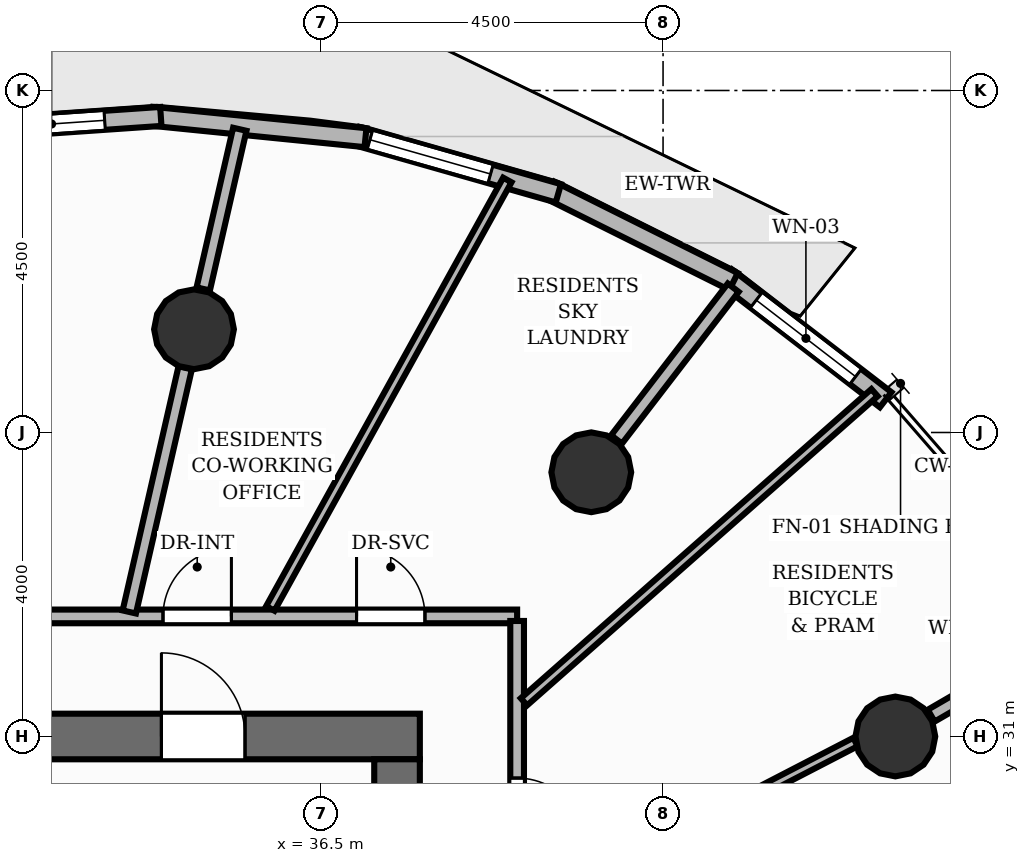
"""IFC4 building model, lengths in metres.
Left out: names, types, materials, properties, quantities, classifications, styles, units other than length and angle.
Written with IfcOpenShell. Run it as: python <this file> out.ifc"""

import sys

from ifc_helpers import new_model, si_unit, direction, frame, frame_2d, origin, origin_2d, place, context, subcontext, project, spatial, rectangle, circle, extrude, element, fill, save


model = new_model("IFC4")
c1 = context("Model", 3, precision=1e-05, world=origin(), true_north=direction((0.0, 1.0)))
c2 = subcontext(c1, "Body", "Model", "MODEL_VIEW")
j1 = project(units=[si_unit("LENGTHUNIT", "METRE"), si_unit("PLANEANGLEUNIT", "RADIAN")], contexts=[c1])
p1 = place(None, origin())
s1 = spatial("IfcSite", under=j1, at=p1, CompositionType="ELEMENT")
p2 = place(p1, origin())
s2 = spatial("IfcBuilding", under=s1, at=p2, CompositionType="ELEMENT")
p3 = place(p2, frame((0.0, 0.0, 145.76)))
s3 = spatial("IfcBuildingStorey", under=s2, at=p3, CompositionType="ELEMENT", Elevation=145.76)
p4 = place(p3, frame((22.7, 31.0, 0.0), z_axis=(0.0, 0.0, 1.0), x_axis=(1.0, 0.0, 0.0)))
e1 = element("IfcWall", 1, at=p4, inside=s3, PredefinedType="SHEAR", context=c2, shape_type="SweptSolid", body=[
    extrude(rectangle(XDim=15.1, YDim=0.6, at=frame_2d((7.55, 0.0))), origin(), (0.0, 0.0, 1.0), 3.2),
])
p5 = place(p4, frame((11.7, 0.0, 0.0)))
e2 = element("IfcOpeningElement", 2, at=p5, cuts=e1, PredefinedType="OPENING", context=c2, shape_type="SweptSolid", body=[
    extrude(rectangle(XDim=1.1, YDim=2.15, at=frame_2d((0.55, 1.075))), frame((0.0, 0.31, 0.0), z_axis=(0.0, -1.0, 0.0), x_axis=(1.0, 0.0, 0.0)), (0.0, 0.0, 1.0), 0.62),
])
p6 = place(p3, frame((37.5, 17.3, 0.0), z_axis=(0.0, 0.0, 1.0), x_axis=(0.0, 1.0, 0.0)))
e3 = element("IfcWall", 3, at=p6, inside=s3, PredefinedType="SHEAR", context=c2, shape_type="SweptSolid", body=[
    extrude(rectangle(XDim=13.4, YDim=0.6, at=frame_2d((6.7, 0.0))), origin(), (0.0, 0.0, 1.0), 3.2),
])
for number, where, z_axis, x_axis in (
    (4, (44.056, 31.0, 0.0), (0.0, 0.0, 1.0), (1.0, 0.0, 0.0)),
    (5, (40.056, 34.477, 0.0), (0.0, 0.0, 1.0), (1.0, 0.0, 0.0)),
    (6, (34.829, 36.358, 0.0), (0.0, 0.0, 1.0), (1.0, 0.0, 0.0)),
):
    element("IfcColumn", number, at=place(p3, frame(where, z_axis=z_axis, x_axis=x_axis)), inside=s3, PredefinedType="COLUMN", context=c2, shape_type="SweptSolid", body=[
        extrude(circle(Radius=0.525, at=origin_2d()), origin(), (0.0, 0.0, 1.0), 3.2),
    ])
p7 = place(p3, frame((41.831, 37.046, 0.0), z_axis=(0.0, 0.0, 1.0), x_axis=(0.7923805969, -0.610027040103, 0.0)))
e7 = element("IfcWall", 7, at=p7, inside=s3, PredefinedType="SOLIDWALL", context=c2, shape_type="SweptSolid", body=[
    extrude(rectangle(XDim=2.648, YDim=0.25, at=frame_2d((1.324, 0.0))), origin(), (0.0, 0.0, 1.0), 2.96),
])
p8 = place(p7, frame((0.499, 0.0, 0.85)))
e8 = element("IfcOpeningElement", 8, at=p8, cuts=e7, PredefinedType="OPENING", context=c2, shape_type="SweptSolid", body=[
    extrude(rectangle(XDim=1.65, YDim=1.55, at=frame_2d((0.825, 0.775))), frame((0.0, 0.135, 0.0), z_axis=(0.0, -1.0, 0.0), x_axis=(1.0, 0.0, 0.0)), (0.0, 0.0, 1.0), 0.27),
])
p9 = place(p3, frame((39.517, 38.188, 0.0), z_axis=(0.0, 0.0, 1.0), x_axis=(0.894843809708, -0.446379385979, 0.0)))
e9 = element("IfcWall", 9, at=p9, inside=s3, PredefinedType="SOLIDWALL", context=c2, shape_type="SweptSolid", body=[
    extrude(rectangle(XDim=2.693, YDim=0.25, at=frame_2d((1.347, 0.0))), origin(), (0.0, 0.0, 1.0), 2.96),
])
p10 = place(p3, frame((36.975, 38.9, 0.0), z_axis=(0.0, 0.0, 1.0), x_axis=(0.961851311091, -0.27357276062, 0.0)))
e10 = element("IfcWall", 10, at=p10, inside=s3, PredefinedType="SOLIDWALL", context=c2, shape_type="SweptSolid", body=[
    extrude(rectangle(XDim=2.752, YDim=0.25, at=frame_2d((1.376, 0.0))), origin(), (0.0, 0.0, 1.0), 2.96),
])
p11 = place(p10, frame((0.175, 0.0, 0.85)))
e11 = element("IfcOpeningElement", 11, at=p11, cuts=e10, PredefinedType="OPENING", context=c2, shape_type="SweptSolid", body=[
    extrude(rectangle(XDim=1.65, YDim=1.55, at=frame_2d((0.825, 0.775))), frame((0.0, 0.135, 0.0), z_axis=(0.0, -1.0, 0.0), x_axis=(1.0, 0.0, 0.0)), (0.0, 0.0, 1.0), 0.27),
])
p12 = place(p3, frame((34.281, 39.16, 0.0), z_axis=(0.0, 0.0, 1.0), x_axis=(0.995013999105, -0.099735357744, 0.0)))
e12 = element("IfcWall", 12, at=p12, inside=s3, PredefinedType="SOLIDWALL", context=c2, shape_type="SweptSolid", body=[
    extrude(rectangle(XDim=2.818, YDim=0.25, at=frame_2d((1.409, 0.0))), origin(), (0.0, 0.0, 1.0), 2.96),
])
p13 = place(p3, frame((31.517, 38.96, 0.0), z_axis=(0.0, 0.0, 1.0), x_axis=(0.997630729469, 0.068796276206, 0.0)))
e13 = element("IfcWall", 13, at=p13, inside=s3, PredefinedType="SOLIDWALL", context=c2, shape_type="SweptSolid", body=[
    extrude(rectangle(XDim=2.882, YDim=0.25, at=frame_2d((1.441, 0.0))), origin(), (0.0, 0.0, 1.0), 2.96),
])
p14 = place(p13, frame((0.741, 0.0, 0.85)))
e14 = element("IfcOpeningElement", 14, at=p14, cuts=e13, PredefinedType="OPENING", context=c2, shape_type="SweptSolid", body=[
    extrude(rectangle(XDim=1.4, YDim=1.55, at=frame_2d((0.7, 0.775))), frame((0.0, 0.135, 0.0), z_axis=(0.0, -1.0, 0.0), x_axis=(1.0, 0.0, 0.0)), (0.0, 0.0, 1.0), 0.27),
])
p15 = place(p3, frame((44.528, 31.274, 0.0), z_axis=(0.0, 0.0, 1.0), x_axis=(0.864802971131, 0.502111363268, 0.0)))
e15 = element("IfcWall", 15, at=p15, inside=s3, PredefinedType="PARTITIONING", context=c2, shape_type="SweptSolid", body=[
    extrude(rectangle(XDim=1.951, YDim=0.18, at=frame_2d((0.975, 0.0))), origin(), (0.0, 0.0, 1.0), 2.336),
])
p16 = place(p3, frame((40.388, 34.908, 0.0), z_axis=(0.0, 0.0, 1.0), x_axis=(0.609556175004, 0.792742877303, 0.0)))
e16 = element("IfcWall", 16, at=p16, inside=s3, PredefinedType="PARTITIONING", context=c2, shape_type="SweptSolid", body=[
    extrude(rectangle(XDim=2.519, YDim=0.18, at=frame_2d((1.259, 0.0))), origin(), (0.0, 0.0, 1.0), 2.336),
])
p17 = place(p3, frame((34.95, 36.889, 0.0), z_axis=(0.0, 0.0, 1.0), x_axis=(0.223080127706, 0.974800111111, 0.0)))
e17 = element("IfcWall", 17, at=p17, inside=s3, PredefinedType="PARTITIONING", context=c2, shape_type="SweptSolid", body=[
    extrude(rectangle(XDim=2.155, YDim=0.18, at=frame_2d((1.077, 0.0))), origin(), (0.0, 0.0, 1.0), 2.336),
])
p18 = place(p3, frame((21.42, 32.58, 0.0), z_axis=(0.0, 0.0, 1.0), x_axis=(1.0, 0.0, 0.0)))
e18 = element("IfcWall", 18, at=p18, inside=s3, PredefinedType="PARTITIONING", context=c2, shape_type="SweptSolid", body=[
    extrude(rectangle(XDim=17.66, YDim=0.18, at=frame_2d((8.83, 0.0))), origin(), (0.0, 0.0, 1.0), 2.955),
])
p19 = place(p18, frame((13.001, 0.0, 0.0)))
e19 = element("IfcOpeningElement", 19, at=p19, cuts=e18, PredefinedType="OPENING", context=c2, shape_type="SweptSolid", body=[
    extrude(rectangle(XDim=0.9, YDim=2.1, at=frame_2d((0.45, 1.05))), frame((0.0, 0.1, 0.0), z_axis=(0.0, -1.0, 0.0), x_axis=(1.0, 0.0, 0.0)), (0.0, 0.0, 1.0), 0.2),
])
p20 = place(p18, frame((15.547, 0.0, 0.0)))
e20 = element("IfcOpeningElement", 20, at=p20, cuts=e18, PredefinedType="OPENING", context=c2, shape_type="SweptSolid", body=[
    extrude(rectangle(XDim=0.9, YDim=2.1, at=frame_2d((0.45, 1.05))), frame((0.0, 0.1, 0.0), z_axis=(0.0, -1.0, 0.0), x_axis=(1.0, 0.0, 0.0)), (0.0, 0.0, 1.0), 0.2),
])
p21 = place(p18, frame((5.757, 0.0, 0.0)))
e21 = element("IfcOpeningElement", 21, at=p21, cuts=e18, PredefinedType="OPENING", context=c2, shape_type="SweptSolid", body=[
    extrude(rectangle(XDim=1.05, YDim=2.15, at=frame_2d((0.525, 1.075))), frame((0.0, 0.1, 0.0), z_axis=(0.0, -1.0, 0.0), x_axis=(1.0, 0.0, 0.0)), (0.0, 0.0, 1.0), 0.2),
])
p22 = place(p3, frame((39.08, 32.52, 0.0), z_axis=(0.0, 0.0, 1.0), x_axis=(0.0, -1.0, 0.0)))
e22 = element("IfcWall", 22, at=p22, inside=s3, PredefinedType="PARTITIONING", context=c2, shape_type="SweptSolid", body=[
    extrude(rectangle(XDim=3.918, YDim=0.18, at=frame_2d((1.959, 0.0))), origin(), (0.0, 0.0, 1.0), 2.955),
])
p23 = place(p22, frame((2.067, 0.0, 0.0)))
e23 = element("IfcOpeningElement", 23, at=p23, cuts=e22, PredefinedType="OPENING", context=c2, shape_type="SweptSolid", body=[
    extrude(rectangle(XDim=0.9, YDim=2.1, at=frame_2d((0.45, 1.05))), frame((0.0, 0.1, 0.0), z_axis=(0.0, -1.0, 0.0), x_axis=(1.0, 0.0, 0.0)), (0.0, 0.0, 1.0), 0.2),
])
p24 = place(p3, frame((38.951, 38.323, 0.0), z_axis=(0.0, 0.0, 1.0), x_axis=(-0.484039777335, -0.875045995338, 0.0)))
e24 = element("IfcWall", 24, at=p24, inside=s3, PredefinedType="PARTITIONING", context=c2, shape_type="SweptSolid", body=[
    extrude(rectangle(XDim=6.442, YDim=0.125, at=frame_2d((3.221, 0.0))), origin(), (0.0, 0.0, 1.0), 2.955),
])
p25 = place(p3, frame((33.977, 32.638, 0.0), z_axis=(0.0, 0.0, 1.0), x_axis=(0.22319287001, 0.974774303506, 0.0)))
e25 = element("IfcWall", 25, at=p25, inside=s3, PredefinedType="PARTITIONING", context=c2, shape_type="SweptSolid", body=[
    extrude(rectangle(XDim=3.296, YDim=0.18, at=frame_2d((1.648, 0.0))), origin(), (0.0, 0.0, 1.0), 2.336),
])
p26 = place(p3, frame((43.783, 35.524, 0.0), z_axis=(0.0, 0.0, 1.0), x_axis=(-0.750018545151, -0.661416798947, 0.0)))
e26 = element("IfcWall", 26, at=p26, inside=s3, PredefinedType="PARTITIONING", context=c2, shape_type="SweptSolid", body=[
    extrude(rectangle(XDim=6.15, YDim=0.125, at=frame_2d((3.075, 0.0))), origin(), (0.0, 0.0, 1.0), 2.692),
])
p27 = place(p3, frame((43.531, 30.927, 0.0), z_axis=(0.0, 0.0, 1.0), x_axis=(-0.888041341995, -0.459763607638, 0.0)))
e27 = element("IfcWall", 27, at=p27, inside=s3, PredefinedType="PARTITIONING", context=c2, shape_type="SweptSolid", body=[
    extrude(rectangle(XDim=4.893, YDim=0.125, at=frame_2d((2.446, 0.0))), origin(), (0.0, 0.0, 1.0), 2.336),
])
p28 = place(p27, frame((1.996, 0.0, 0.0)))
e28 = element("IfcOpeningElement", 28, at=p28, cuts=e27, PredefinedType="OPENING", context=c2, shape_type="SweptSolid", body=[
    extrude(rectangle(XDim=0.9, YDim=2.1, at=frame_2d((0.45, 1.05))), frame((0.0, 0.073, 0.0), z_axis=(0.0, -1.0, 0.0), x_axis=(1.0, 0.0, 0.0)), (0.0, 0.0, 1.0), 0.145),
])
p29 = place(p3, frame((39.174, 27.577, 0.0), z_axis=(0.0, 0.0, 1.0), x_axis=(0.9372070401, 0.348773513883, 0.0)))
e29 = element("IfcWall", 29, at=p29, inside=s3, PredefinedType="PARTITIONING", context=c2, shape_type="SweptSolid", body=[
    extrude(rectangle(XDim=8.395, YDim=0.125, at=frame_2d((4.198, 0.0))), origin(), (0.0, 0.0, 1.0), 2.692),
])
p30 = place(p8, origin())
e30 = element("IfcWindow", 30, at=p30, inside=s3, PartitioningType="SINGLE_PANEL", PredefinedType="WINDOW", context=c2, shape_type="SweptSolid", body=[
    extrude(rectangle(XDim=1.65, YDim=1.55, at=frame_2d((0.825, 0.775))), frame((0.0, 0.03, 0.0), z_axis=(0.0, -1.0, 0.0), x_axis=(1.0, 0.0, 0.0)), (0.0, 0.0, 1.0), 0.06),
])
fill(e8, e30)
p31 = place(p11, origin())
e31 = element("IfcWindow", 31, at=p31, inside=s3, PartitioningType="SINGLE_PANEL", PredefinedType="WINDOW", context=c2, shape_type="SweptSolid", body=[
    extrude(rectangle(XDim=1.65, YDim=1.55, at=frame_2d((0.825, 0.775))), frame((0.0, 0.03, 0.0), z_axis=(0.0, -1.0, 0.0), x_axis=(1.0, 0.0, 0.0)), (0.0, 0.0, 1.0), 0.06),
])
fill(e11, e31)
p32 = place(p14, origin())
e32 = element("IfcWindow", 32, at=p32, inside=s3, PartitioningType="SINGLE_PANEL", PredefinedType="WINDOW", context=c2, shape_type="SweptSolid", body=[
    extrude(rectangle(XDim=1.4, YDim=1.55, at=frame_2d((0.7, 0.775))), frame((0.0, 0.03, 0.0), z_axis=(0.0, -1.0, 0.0), x_axis=(1.0, 0.0, 0.0)), (0.0, 0.0, 1.0), 0.06),
])
fill(e14, e32)
p33 = place(p5, origin())
e33 = element("IfcDoor", 33, at=p33, inside=s3, OperationType="SINGLE_SWING_LEFT", PredefinedType="DOOR", context=c2, shape_type="SweptSolid", body=[
    extrude(rectangle(XDim=1.1, YDim=2.15, at=frame_2d((0.55, 1.075))), frame((0.0, 0.025, 0.0), z_axis=(0.0, -1.0, 0.0), x_axis=(1.0, 0.0, 0.0)), (0.0, 0.0, 1.0), 0.05),
])
fill(e2, e33)
p34 = place(p19, origin())
e34 = element("IfcDoor", 34, at=p34, inside=s3, OperationType="SINGLE_SWING_RIGHT", PredefinedType="DOOR", context=c2, shape_type="SweptSolid", body=[
    extrude(rectangle(XDim=0.9, YDim=2.1, at=frame_2d((0.45, 1.05))), frame((0.0, 0.025, 0.0), z_axis=(0.0, -1.0, 0.0), x_axis=(1.0, 0.0, 0.0)), (0.0, 0.0, 1.0), 0.05),
])
fill(e19, e34)
p35 = place(p20, origin())
e35 = element("IfcDoor", 35, at=p35, inside=s3, OperationType="SINGLE_SWING_LEFT", PredefinedType="DOOR", context=c2, shape_type="SweptSolid", body=[
    extrude(rectangle(XDim=0.9, YDim=2.1, at=frame_2d((0.45, 1.05))), frame((0.0, 0.025, 0.0), z_axis=(0.0, -1.0, 0.0), x_axis=(1.0, 0.0, 0.0)), (0.0, 0.0, 1.0), 0.05),
])
fill(e20, e35)
p36 = place(p23, origin())
e36 = element("IfcDoor", 36, at=p36, inside=s3, OperationType="SINGLE_SWING_RIGHT", PredefinedType="DOOR", context=c2, shape_type="SweptSolid", body=[
    extrude(rectangle(XDim=0.9, YDim=2.1, at=frame_2d((0.45, 1.05))), frame((0.0, 0.025, 0.0), z_axis=(0.0, -1.0, 0.0), x_axis=(1.0, 0.0, 0.0)), (0.0, 0.0, 1.0), 0.05),
])
fill(e23, e36)
save(model, sys.argv[1])
